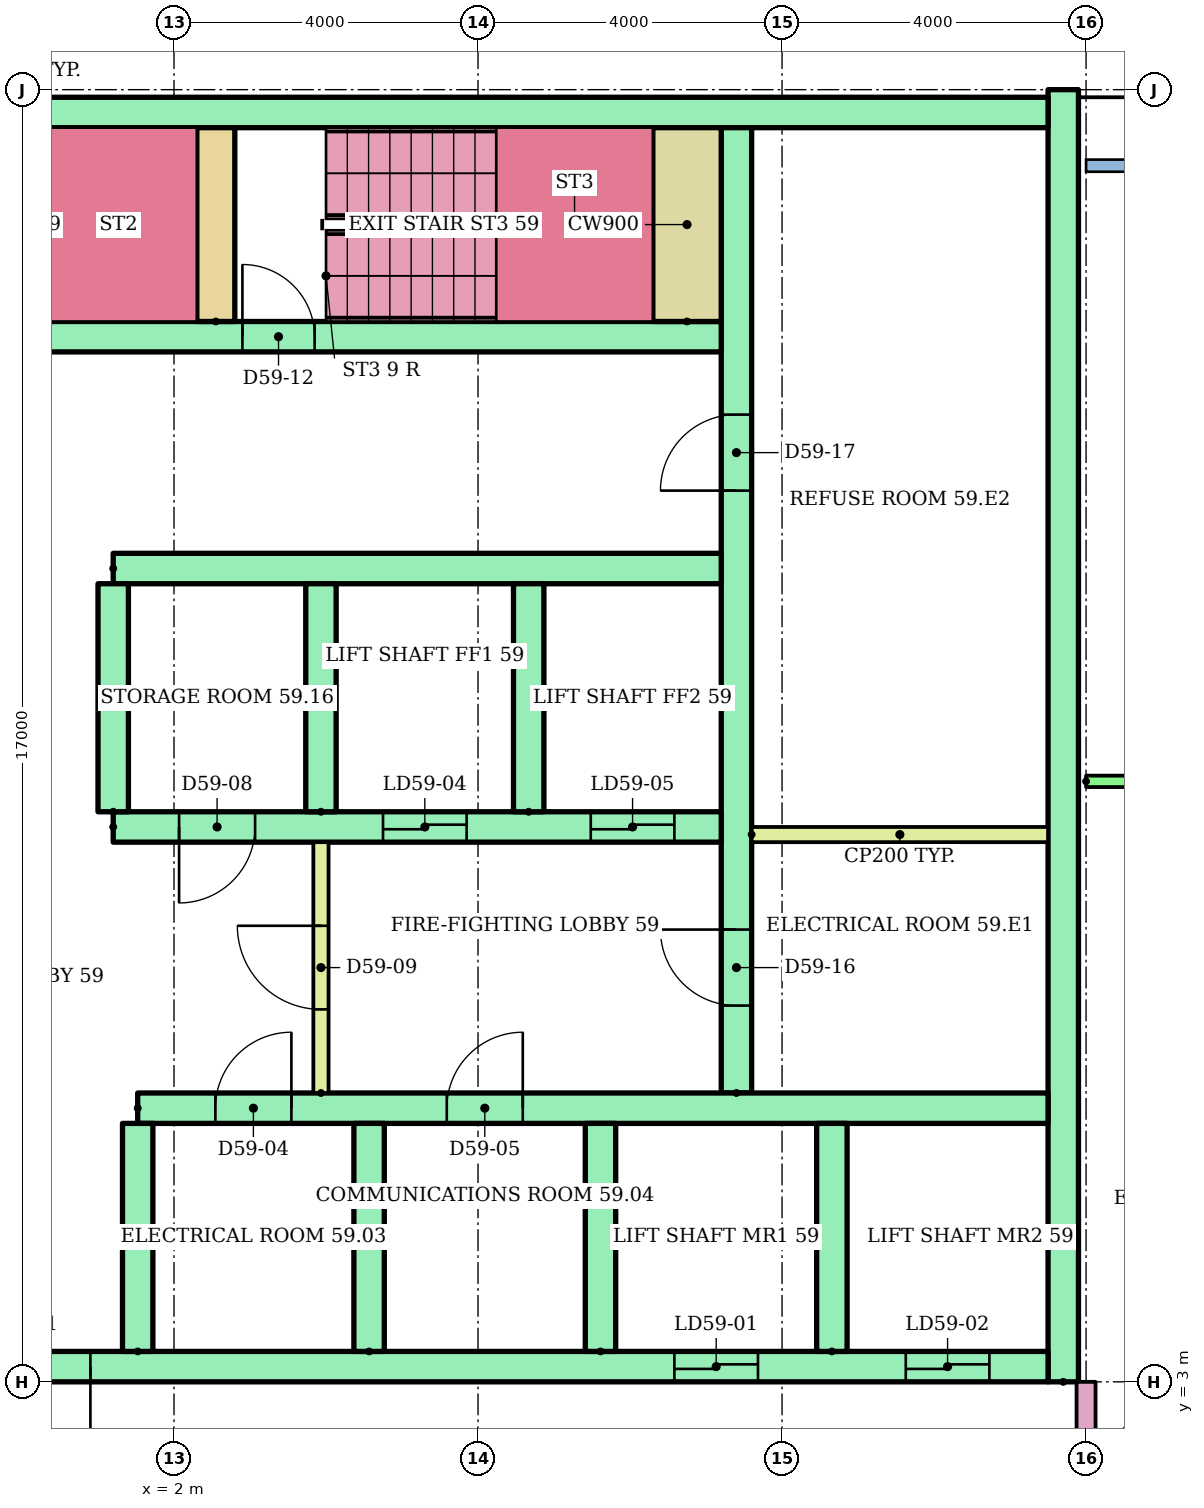
"""IFC4 building model, lengths in metres.
Left out: names, types, materials, properties, quantities, classifications, styles, units other than length and angle.
Written with IfcOpenShell. Run it as: python <this file> out.ifc"""

import sys

from ifc_helpers import new_model, si_unit, direction, frame, frame_2d, origin, place, context, subcontext, project, spatial, rectangle, extrude, element, fill, save


model = new_model("IFC4")
c1 = context("Model", 3, precision=1e-05, world=origin(), true_north=direction((0.0, 1.0)))
c2 = subcontext(c1, "Body", "Model", "MODEL_VIEW")
j1 = project(units=[si_unit("LENGTHUNIT", "METRE"), si_unit("PLANEANGLEUNIT", "RADIAN")], contexts=[c1])
p1 = place(None, origin())
s1 = spatial("IfcSite", under=j1, at=p1, CompositionType="ELEMENT")
p2 = place(p1, origin())
s2 = spatial("IfcBuilding", under=s1, at=p2, CompositionType="ELEMENT")
p3 = place(p2, frame((0.0, 0.0, 226.8)))
s3 = spatial("IfcBuildingStorey", under=s2, at=p3, CompositionType="ELEMENT", Elevation=226.8)
p4 = place(p3, frame((13.7, 3.0, 0.0), z_axis=(0.0, 0.0, 1.0), x_axis=(0.0, 1.0, 0.0)))
e1 = element("IfcWall", 1, at=p4, inside=s3, PredefinedType="SHEAR", context=c2, shape_type="SweptSolid", body=[
    extrude(rectangle(XDim=17.0, YDim=0.4, at=frame_2d((8.5, 0.0))), origin(), (0.0, 0.0, 1.0), 2.92),
])
p5 = place(p3, frame((-13.5, 19.7, 0.0)))
e2 = element("IfcWall", 2, at=p5, inside=s3, PredefinedType="SHEAR", context=c2, shape_type="SweptSolid", body=[
    extrude(rectangle(XDim=27.0, YDim=0.4, at=frame_2d((13.5, 0.0))), origin(), (0.0, 0.0, 1.0), 2.92),
])
p6 = place(p3, frame((9.4, 6.8, 0.0), z_axis=(0.0, 0.0, 1.0), x_axis=(0.0, 1.0, 0.0)))
e3 = element("IfcWall", 3, at=p6, inside=s3, PredefinedType="SHEAR", context=c2, shape_type="SweptSolid", body=[
    extrude(rectangle(XDim=12.7, YDim=0.4, at=frame_2d((6.35, 0.0))), origin(), (0.0, 0.0, 1.0), 2.92),
])
p7 = place(p6, frame((1.15, 0.0, 0.0)))
e4 = element("IfcOpeningElement", 4, at=p7, cuts=e3, PredefinedType="OPENING", context=c2, shape_type="SweptSolid", body=[
    extrude(rectangle(XDim=1.0, YDim=2.1, at=frame_2d((0.5, 1.05))), frame((0.0, 0.21, 0.0), z_axis=(0.0, -1.0, 0.0), x_axis=(1.0, 0.0, 0.0)), (0.0, 0.0, 1.0), 0.42),
])
p8 = place(p6, frame((7.925, 0.0, 0.0)))
e5 = element("IfcOpeningElement", 5, at=p8, cuts=e3, PredefinedType="OPENING", context=c2, shape_type="SweptSolid", body=[
    extrude(rectangle(XDim=1.0, YDim=2.1, at=frame_2d((0.5, 1.05))), frame((0.0, 0.21, 0.0), z_axis=(0.0, -1.0, 0.0), x_axis=(1.0, 0.0, 0.0)), (0.0, 0.0, 1.0), 0.42),
])
p9 = place(p3, frame((-13.5, 3.2, 0.0)))
e6 = element("IfcWall", 6, at=p9, inside=s3, PredefinedType="SHEAR", context=c2, shape_type="SweptSolid", body=[
    extrude(rectangle(XDim=27.0, YDim=0.4, at=frame_2d((13.5, 0.0))), origin(), (0.0, 0.0, 1.0), 2.92),
])
p10 = place(p9, frame((22.083, 0.0, 0.0)))
e7 = element("IfcOpeningElement", 7, at=p10, cuts=e6, PredefinedType="OPENING", context=c2, shape_type="SweptSolid", body=[
    extrude(rectangle(XDim=1.1, YDim=2.1, at=frame_2d((0.55, 1.05))), frame((0.0, 0.21, 0.0), z_axis=(0.0, -1.0, 0.0), x_axis=(1.0, 0.0, 0.0)), (0.0, 0.0, 1.0), 0.42),
])
p11 = place(p9, frame((25.128, 0.0, 0.0)))
e8 = element("IfcOpeningElement", 8, at=p11, cuts=e6, PredefinedType="OPENING", context=c2, shape_type="SweptSolid", body=[
    extrude(rectangle(XDim=1.1, YDim=2.1, at=frame_2d((0.55, 1.05))), frame((0.0, 0.21, 0.0), z_axis=(0.0, -1.0, 0.0), x_axis=(1.0, 0.0, 0.0)), (0.0, 0.0, 1.0), 0.42),
])
p12 = place(p9, frame((12.6, 0.0, 0.0)))
e9 = element("IfcOpeningElement", 9, at=p12, cuts=e6, PredefinedType="OPENING", context=c2, shape_type="SweptSolid", body=[
    extrude(rectangle(XDim=1.8, YDim=2.1, at=frame_2d((0.9, 1.05))), frame((0.0, 0.21, 0.0), z_axis=(0.0, -1.0, 0.0), x_axis=(1.0, 0.0, 0.0)), (0.0, 0.0, 1.0), 0.42),
])
p13 = place(p3, frame((1.522, 6.6, 0.0)))
e10 = element("IfcWall", 10, at=p13, inside=s3, PredefinedType="SHEAR", context=c2, shape_type="SweptSolid", body=[
    extrude(rectangle(XDim=11.978, YDim=0.4, at=frame_2d((5.989, 0.0))), origin(), (0.0, 0.0, 1.0), 2.92),
])
p14 = place(p13, frame((1.022, 0.0, 0.0)))
e11 = element("IfcOpeningElement", 11, at=p14, cuts=e10, PredefinedType="OPENING", context=c2, shape_type="SweptSolid", body=[
    extrude(rectangle(XDim=1.0, YDim=2.1, at=frame_2d((0.5, 1.05))), frame((0.0, 0.21, 0.0), z_axis=(0.0, -1.0, 0.0), x_axis=(1.0, 0.0, 0.0)), (0.0, 0.0, 1.0), 0.42),
])
p15 = place(p13, frame((4.067, 0.0, 0.0)))
e12 = element("IfcOpeningElement", 12, at=p15, cuts=e10, PredefinedType="OPENING", context=c2, shape_type="SweptSolid", body=[
    extrude(rectangle(XDim=1.0, YDim=2.1, at=frame_2d((0.5, 1.05))), frame((0.0, 0.21, 0.0), z_axis=(0.0, -1.0, 0.0), x_axis=(1.0, 0.0, 0.0)), (0.0, 0.0, 1.0), 0.42),
])
for number, where, z_axis, x_axis in (
    (13, (1.522, 3.4, 0.0), (0.0, 0.0, 1.0), (0.0, 1.0, 0.0)),
    (14, (4.567, 3.4, 0.0), (0.0, 0.0, 1.0), (0.0, 1.0, 0.0)),
    (15, (7.611, 3.4, 0.0), (0.0, 0.0, 1.0), (0.0, 1.0, 0.0)),
    (16, (10.656, 3.4, 0.0), (0.0, 0.0, 1.0), (0.0, 1.0, 0.0)),
):
    element("IfcWall", number, at=place(p3, frame(where, z_axis=z_axis, x_axis=x_axis)), inside=s3, PredefinedType="SHEAR", context=c2, shape_type="SweptSolid", body=[
        extrude(rectangle(XDim=3.0, YDim=0.4, at=frame_2d((1.5, 0.0))), origin(), (0.0, 0.0, 1.0), 2.92),
    ])
p16 = place(p3, frame((1.2, 10.3, 0.0)))
e17 = element("IfcWall", 17, at=p16, inside=s3, PredefinedType="SHEAR", context=c2, shape_type="SweptSolid", body=[
    extrude(rectangle(XDim=8.0, YDim=0.4, at=frame_2d((4.0, 0.0))), origin(), (0.0, 0.0, 1.0), 2.92),
])
p17 = place(p16, frame((3.55, 0.0, 0.0)))
e18 = element("IfcOpeningElement", 18, at=p17, cuts=e17, PredefinedType="OPENING", context=c2, shape_type="SweptSolid", body=[
    extrude(rectangle(XDim=1.1, YDim=2.1, at=frame_2d((0.55, 1.05))), frame((0.0, 0.21, 0.0), z_axis=(0.0, -1.0, 0.0), x_axis=(1.0, 0.0, 0.0)), (0.0, 0.0, 1.0), 0.42),
])
p18 = place(p16, frame((6.283, 0.0, 0.0)))
e19 = element("IfcOpeningElement", 19, at=p18, cuts=e17, PredefinedType="OPENING", context=c2, shape_type="SweptSolid", body=[
    extrude(rectangle(XDim=1.1, YDim=2.1, at=frame_2d((0.55, 1.05))), frame((0.0, 0.21, 0.0), z_axis=(0.0, -1.0, 0.0), x_axis=(1.0, 0.0, 0.0)), (0.0, 0.0, 1.0), 0.42),
])
p19 = place(p16, frame((0.867, 0.0, 0.0)))
e20 = element("IfcOpeningElement", 20, at=p19, cuts=e17, PredefinedType="OPENING", context=c2, shape_type="SweptSolid", body=[
    extrude(rectangle(XDim=1.0, YDim=2.1, at=frame_2d((0.5, 1.05))), frame((0.0, 0.21, 0.0), z_axis=(0.0, -1.0, 0.0), x_axis=(1.0, 0.0, 0.0)), (0.0, 0.0, 1.0), 0.42),
])
p20 = place(p3, frame((1.2, 13.7, 0.0)))
e21 = element("IfcWall", 21, at=p20, inside=s3, PredefinedType="SHEAR", context=c2, shape_type="SweptSolid", body=[
    extrude(rectangle(XDim=8.0, YDim=0.4, at=frame_2d((4.0, 0.0))), origin(), (0.0, 0.0, 1.0), 2.92),
])
for number, where, z_axis, x_axis in (
    (22, (1.2, 10.5, 0.0), (0.0, 0.0, 1.0), (0.0, 1.0, 0.0)),
    (23, (3.933, 10.5, 0.0), (0.0, 0.0, 1.0), (0.0, 1.0, 0.0)),
    (24, (6.667, 10.5, 0.0), (0.0, 0.0, 1.0), (0.0, 1.0, 0.0)),
):
    element("IfcWall", number, at=place(p3, frame(where, z_axis=z_axis, x_axis=x_axis)), inside=s3, PredefinedType="SHEAR", context=c2, shape_type="SweptSolid", body=[
        extrude(rectangle(XDim=3.0, YDim=0.4, at=frame_2d((1.5, 0.0))), origin(), (0.0, 0.0, 1.0), 2.92),
    ])
p21 = place(p3, frame((3.933, 6.8, 0.0), z_axis=(0.0, 0.0, 1.0), x_axis=(0.0, 1.0, 0.0)))
e25 = element("IfcWall", 25, at=p21, inside=s3, PredefinedType="PARTITIONING", context=c2, shape_type="SweptSolid", body=[
    extrude(rectangle(XDim=3.3, YDim=0.2, at=frame_2d((1.65, 0.0))), origin(), (0.0, 0.0, 1.0), 2.92),
])
p22 = place(p21, frame((1.1, 0.0, 0.0)))
e26 = element("IfcOpeningElement", 26, at=p22, cuts=e25, PredefinedType="OPENING", context=c2, shape_type="SweptSolid", body=[
    extrude(rectangle(XDim=1.1, YDim=2.1, at=frame_2d((0.55, 1.05))), frame((0.0, 0.11, 0.0), z_axis=(0.0, -1.0, 0.0), x_axis=(1.0, 0.0, 0.0)), (0.0, 0.0, 1.0), 0.22),
])
p23 = place(p3, frame((-9.2, 16.75, 0.0)))
e27 = element("IfcWall", 27, at=p23, inside=s3, PredefinedType="SHEAR", context=c2, shape_type="SweptSolid", body=[
    extrude(rectangle(XDim=18.4, YDim=0.4, at=frame_2d((9.2, 0.0))), origin(), (0.0, 0.0, 1.0), 2.92),
])
p24 = place(p23, frame((0.1, 0.0, 0.0)))
e28 = element("IfcOpeningElement", 28, at=p24, cuts=e27, PredefinedType="OPENING", context=c2, shape_type="SweptSolid", body=[
    extrude(rectangle(XDim=0.95, YDim=2.1, at=frame_2d((0.475, 1.05))), frame((0.0, 0.21, 0.0), z_axis=(0.0, -1.0, 0.0), x_axis=(1.0, 0.0, 0.0)), (0.0, 0.0, 1.0), 0.42),
])
p25 = place(p23, frame((6.1, 0.0, 0.0)))
e29 = element("IfcOpeningElement", 29, at=p25, cuts=e27, PredefinedType="OPENING", context=c2, shape_type="SweptSolid", body=[
    extrude(rectangle(XDim=0.95, YDim=2.1, at=frame_2d((0.475, 1.05))), frame((0.0, 0.21, 0.0), z_axis=(0.0, -1.0, 0.0), x_axis=(1.0, 0.0, 0.0)), (0.0, 0.0, 1.0), 0.42),
])
p26 = place(p23, frame((12.1, 0.0, 0.0)))
e30 = element("IfcOpeningElement", 30, at=p26, cuts=e27, PredefinedType="OPENING", context=c2, shape_type="SweptSolid", body=[
    extrude(rectangle(XDim=0.95, YDim=2.1, at=frame_2d((0.475, 1.05))), frame((0.0, 0.21, 0.0), z_axis=(0.0, -1.0, 0.0), x_axis=(1.0, 0.0, 0.0)), (0.0, 0.0, 1.0), 0.42),
])
p27 = place(p3, frame((2.55, 16.95, 0.0), z_axis=(0.0, 0.0, 1.0), x_axis=(0.0, 1.0, 0.0)))
e31 = element("IfcWall", 31, at=p27, inside=s3, PredefinedType="SHEAR", context=c2, shape_type="SweptSolid", body=[
    extrude(rectangle(XDim=2.55, YDim=0.5, at=frame_2d((1.275, 0.0))), origin(), (0.0, 0.0, 1.0), 2.92),
])
p28 = place(p3, frame((8.75, 16.95, 0.0), z_axis=(0.0, 0.0, 1.0), x_axis=(0.0, 1.0, 0.0)))
e32 = element("IfcWall", 32, at=p28, inside=s3, PredefinedType="SHEAR", context=c2, shape_type="SweptSolid", body=[
    extrude(rectangle(XDim=2.55, YDim=0.9, at=frame_2d((1.275, 0.0))), origin(), (0.0, 0.0, 1.0), 2.92),
])
p29 = place(p3, frame((9.6, 10.2, 0.0)))
e33 = element("IfcWall", 33, at=p29, inside=s3, PredefinedType="PARTITIONING", context=c2, shape_type="SweptSolid", body=[
    extrude(rectangle(XDim=3.9, YDim=0.2, at=frame_2d((1.95, 0.0))), origin(), (0.0, 0.0, 1.0), 2.92),
])
p30 = place(p3, frame((14.0, 10.9, 0.0)))
e34 = element("IfcWall", 34, at=p30, inside=s3, PredefinedType="PARTITIONING", context=c2, shape_type="SweptSolid", body=[
    extrude(rectangle(XDim=14.91, YDim=0.15, at=frame_2d((7.455, 0.0))), origin(), (0.0, 0.0, 1.0), 2.4),
])
p31 = place(p30, frame((4.6, 0.0, 0.0)))
e35 = element("IfcOpeningElement", 35, at=p31, cuts=e34, PredefinedType="OPENING", context=c2, shape_type="SweptSolid", body=[
    extrude(rectangle(XDim=1.0, YDim=2.1, at=frame_2d((0.5, 1.05))), frame((0.0, 0.085, 0.0), z_axis=(0.0, -1.0, 0.0), x_axis=(1.0, 0.0, 0.0)), (0.0, 0.0, 1.0), 0.17),
])
p32 = place(p30, frame((12.476, 0.0, 0.0)))
e36 = element("IfcOpeningElement", 36, at=p32, cuts=e34, PredefinedType="OPENING", context=c2, shape_type="SweptSolid", body=[
    extrude(rectangle(XDim=0.9, YDim=2.1, at=frame_2d((0.45, 1.05))), frame((0.0, 0.085, 0.0), z_axis=(0.0, -1.0, 0.0), x_axis=(1.0, 0.0, 0.0)), (0.0, 0.0, 1.0), 0.17),
])
p33 = place(p3, frame((14.0, 1.4, 0.0), z_axis=(0.0, 0.0, 1.0), x_axis=(0.0, 1.0, 0.0)))
e37 = element("IfcWall", 37, at=p33, inside=s3, PredefinedType="PARTITIONING", context=c2, shape_type="SweptSolid", body=[
    extrude(rectangle(XDim=1.6, YDim=0.25, at=frame_2d((0.8, 0.0))), origin(), (0.0, 0.0, 1.0), 2.4),
])
p34 = place(p10, origin())
e38 = element("IfcDoor", 38, at=p34, inside=s3, OperationType="SLIDING_TO_LEFT", PredefinedType="DOOR", context=c2, shape_type="SweptSolid", body=[
    extrude(rectangle(XDim=1.1, YDim=2.1, at=frame_2d((0.55, 1.05))), frame((0.0, 0.025, 0.0), z_axis=(0.0, -1.0, 0.0), x_axis=(1.0, 0.0, 0.0)), (0.0, 0.0, 1.0), 0.05),
])
fill(e7, e38)
p35 = place(p11, origin())
e39 = element("IfcDoor", 39, at=p35, inside=s3, OperationType="SLIDING_TO_LEFT", PredefinedType="DOOR", context=c2, shape_type="SweptSolid", body=[
    extrude(rectangle(XDim=1.1, YDim=2.1, at=frame_2d((0.55, 1.05))), frame((0.0, 0.025, 0.0), z_axis=(0.0, -1.0, 0.0), x_axis=(1.0, 0.0, 0.0)), (0.0, 0.0, 1.0), 0.05),
])
fill(e8, e39)
p36 = place(p12, frame((1.8, 0.0, 0.0), z_axis=(0.0, 0.0, 1.0), x_axis=(-1.0, 0.0, 0.0)))
e40 = element("IfcDoor", 40, at=p36, inside=s3, OperationType="DOUBLE_DOOR_SINGLE_SWING", PredefinedType="DOOR", context=c2, shape_type="SweptSolid", body=[
    extrude(rectangle(XDim=1.8, YDim=2.1, at=frame_2d((0.9, 1.05))), frame((0.0, 0.025, 0.0), z_axis=(0.0, -1.0, 0.0), x_axis=(1.0, 0.0, 0.0)), (0.0, 0.0, 1.0), 0.05),
])
fill(e9, e40)
p37 = place(p14, origin())
e41 = element("IfcDoor", 41, at=p37, inside=s3, OperationType="SINGLE_SWING_RIGHT", PredefinedType="DOOR", context=c2, shape_type="SweptSolid", body=[
    extrude(rectangle(XDim=1.0, YDim=2.1, at=frame_2d((0.5, 1.05))), frame((0.0, 0.025, 0.0), z_axis=(0.0, -1.0, 0.0), x_axis=(1.0, 0.0, 0.0)), (0.0, 0.0, 1.0), 0.05),
])
fill(e11, e41)
p38 = place(p15, origin())
e42 = element("IfcDoor", 42, at=p38, inside=s3, OperationType="SINGLE_SWING_RIGHT", PredefinedType="DOOR", context=c2, shape_type="SweptSolid", body=[
    extrude(rectangle(XDim=1.0, YDim=2.1, at=frame_2d((0.5, 1.05))), frame((0.0, 0.025, 0.0), z_axis=(0.0, -1.0, 0.0), x_axis=(1.0, 0.0, 0.0)), (0.0, 0.0, 1.0), 0.05),
])
fill(e12, e42)
p39 = place(p17, origin())
e43 = element("IfcDoor", 43, at=p39, inside=s3, OperationType="SLIDING_TO_LEFT", PredefinedType="DOOR", context=c2, shape_type="SweptSolid", body=[
    extrude(rectangle(XDim=1.1, YDim=2.1, at=frame_2d((0.55, 1.05))), frame((0.0, 0.025, 0.0), z_axis=(0.0, -1.0, 0.0), x_axis=(1.0, 0.0, 0.0)), (0.0, 0.0, 1.0), 0.05),
])
fill(e18, e43)
p40 = place(p18, origin())
e44 = element("IfcDoor", 44, at=p40, inside=s3, OperationType="SLIDING_TO_LEFT", PredefinedType="DOOR", context=c2, shape_type="SweptSolid", body=[
    extrude(rectangle(XDim=1.1, YDim=2.1, at=frame_2d((0.55, 1.05))), frame((0.0, 0.025, 0.0), z_axis=(0.0, -1.0, 0.0), x_axis=(1.0, 0.0, 0.0)), (0.0, 0.0, 1.0), 0.05),
])
fill(e19, e44)
p41 = place(p19, frame((1.0, 0.0, 0.0), z_axis=(0.0, 0.0, 1.0), x_axis=(-1.0, 0.0, 0.0)))
e45 = element("IfcDoor", 45, at=p41, inside=s3, OperationType="SINGLE_SWING_LEFT", PredefinedType="DOOR", context=c2, shape_type="SweptSolid", body=[
    extrude(rectangle(XDim=1.0, YDim=2.1, at=frame_2d((0.5, 1.05))), frame((0.0, 0.025, 0.0), z_axis=(0.0, -1.0, 0.0), x_axis=(1.0, 0.0, 0.0)), (0.0, 0.0, 1.0), 0.05),
])
fill(e20, e45)
p42 = place(p22, origin())
e46 = element("IfcDoor", 46, at=p42, inside=s3, OperationType="SINGLE_SWING_RIGHT", PredefinedType="DOOR", context=c2, shape_type="SweptSolid", body=[
    extrude(rectangle(XDim=1.1, YDim=2.1, at=frame_2d((0.55, 1.05))), frame((0.0, 0.025, 0.0), z_axis=(0.0, -1.0, 0.0), x_axis=(1.0, 0.0, 0.0)), (0.0, 0.0, 1.0), 0.05),
])
fill(e26, e46)
p43 = place(p26, origin())
e47 = element("IfcDoor", 47, at=p43, inside=s3, OperationType="SINGLE_SWING_LEFT", PredefinedType="DOOR", context=c2, shape_type="SweptSolid", body=[
    extrude(rectangle(XDim=0.95, YDim=2.1, at=frame_2d((0.475, 1.05))), frame((0.0, 0.025, 0.0), z_axis=(0.0, -1.0, 0.0), x_axis=(1.0, 0.0, 0.0)), (0.0, 0.0, 1.0), 0.05),
])
fill(e30, e47)
p44 = place(p7, origin())
e48 = element("IfcDoor", 48, at=p44, inside=s3, OperationType="SINGLE_SWING_RIGHT", PredefinedType="DOOR", context=c2, shape_type="SweptSolid", body=[
    extrude(rectangle(XDim=1.0, YDim=2.1, at=frame_2d((0.5, 1.05))), frame((0.0, 0.025, 0.0), z_axis=(0.0, -1.0, 0.0), x_axis=(1.0, 0.0, 0.0)), (0.0, 0.0, 1.0), 0.05),
])
fill(e4, e48)
p45 = place(p8, origin())
e49 = element("IfcDoor", 49, at=p45, inside=s3, OperationType="SINGLE_SWING_LEFT", PredefinedType="DOOR", context=c2, shape_type="SweptSolid", body=[
    extrude(rectangle(XDim=1.0, YDim=2.1, at=frame_2d((0.5, 1.05))), frame((0.0, 0.025, 0.0), z_axis=(0.0, -1.0, 0.0), x_axis=(1.0, 0.0, 0.0)), (0.0, 0.0, 1.0), 0.05),
])
fill(e5, e49)
save(model, sys.argv[1])
